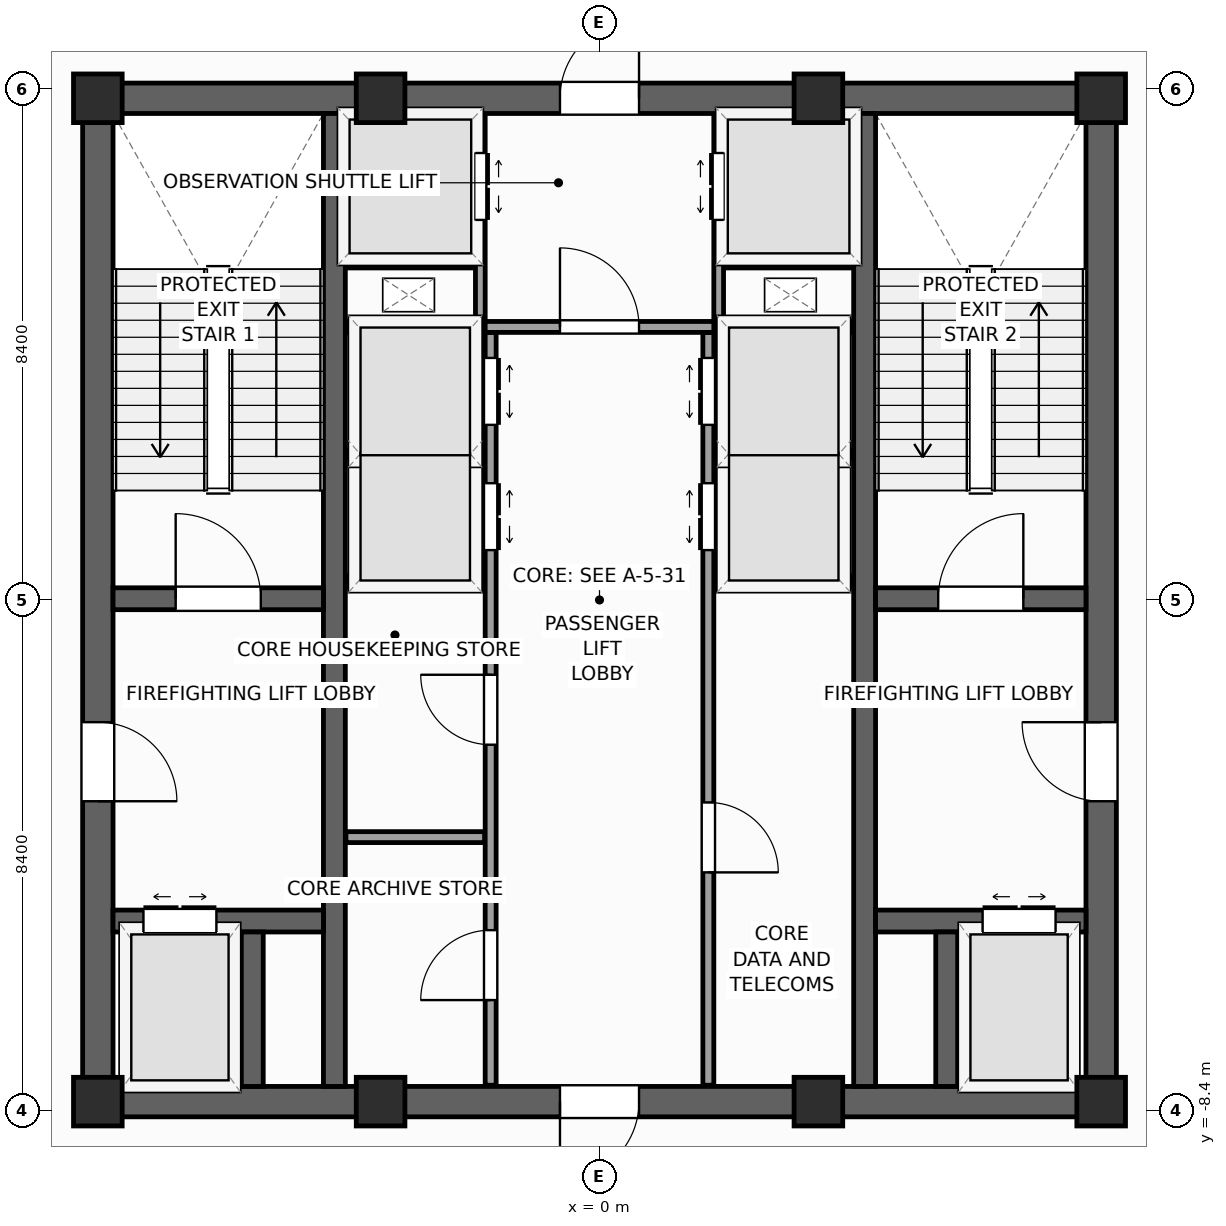
"""IFC4 building model, lengths in metres.
Left out: names, types, materials, properties, quantities, classifications, styles, units other than length and angle.
Written with IfcOpenShell. Run it as: python <this file> out.ifc"""

import sys

from ifc_helpers import new_model, si_unit, direction, frame, frame_2d, origin, origin_2d, place, context, subcontext, project, spatial, rectangle, extrude, source, transform, mapped, element, fill, save


model = new_model("IFC4")
c1 = context("Model", 3, precision=1e-05, world=origin(), true_north=direction((0.0, 1.0)))
c2 = subcontext(c1, "Body", "Model", "MODEL_VIEW")
j1 = project(units=[si_unit("LENGTHUNIT", "METRE"), si_unit("PLANEANGLEUNIT", "RADIAN")], contexts=[c1])
p1 = place(None, origin())
s1 = spatial("IfcSite", under=j1, at=p1, CompositionType="ELEMENT")
p2 = place(p1, origin())
s2 = spatial("IfcBuilding", under=s1, at=p2, CompositionType="ELEMENT")
p3 = place(p2, frame((0.0, 0.0, 316.8)))
s3 = spatial("IfcBuildingStorey", under=s2, at=p3, CompositionType="ELEMENT", Elevation=316.8)
p4 = place(p3, frame((-8.5, -8.25, 0.0), z_axis=(0.0, 0.0, 1.0), x_axis=(1.0, 0.0, 0.0)))
e1 = element("IfcWall", 1, at=p4, inside=s3, PredefinedType="SHEAR", context=c2, shape_type="SweptSolid", body=[
    extrude(rectangle(XDim=17.0, YDim=0.5, at=frame_2d((8.5, 0.0))), origin(), (0.0, 0.0, 1.0), 4.8),
])
p5 = place(p4, frame((7.85, 0.0, 0.0)))
e2 = element("IfcOpeningElement", 2, at=p5, cuts=e1, PredefinedType="OPENING", context=c2, shape_type="SweptSolid", body=[
    extrude(rectangle(XDim=1.3, YDim=2.2, at=frame_2d((0.65, 1.1))), frame((0.0, 0.26, 0.0), z_axis=(0.0, -1.0, 0.0), x_axis=(1.0, 0.0, 0.0)), (0.0, 0.0, 1.0), 0.52),
])
p6 = place(p3, frame((-8.5, 8.25, 0.0), z_axis=(0.0, 0.0, 1.0), x_axis=(1.0, 0.0, 0.0)))
e3 = element("IfcWall", 3, at=p6, inside=s3, PredefinedType="SHEAR", context=c2, shape_type="SweptSolid", body=[
    extrude(rectangle(XDim=17.0, YDim=0.5, at=frame_2d((8.5, 0.0))), origin(), (0.0, 0.0, 1.0), 4.8),
])
p7 = place(p6, frame((7.85, 0.0, 0.0)))
e4 = element("IfcOpeningElement", 4, at=p7, cuts=e3, PredefinedType="OPENING", context=c2, shape_type="SweptSolid", body=[
    extrude(rectangle(XDim=1.3, YDim=2.2, at=frame_2d((0.65, 1.1))), frame((0.0, 0.26, 0.0), z_axis=(0.0, -1.0, 0.0), x_axis=(1.0, 0.0, 0.0)), (0.0, 0.0, 1.0), 0.52),
])
p8 = place(p3, frame((-8.25, -8.0, 0.0), z_axis=(0.0, 0.0, 1.0), x_axis=(0.0, 1.0, 0.0)))
e5 = element("IfcWall", 5, at=p8, inside=s3, PredefinedType="SHEAR", context=c2, shape_type="SweptSolid", body=[
    extrude(rectangle(XDim=16.0, YDim=0.5, at=frame_2d((8.0, 0.0))), origin(), (0.0, 0.0, 1.0), 4.8),
])
p9 = place(p8, frame((4.69, 0.0, 0.0)))
e6 = element("IfcOpeningElement", 6, at=p9, cuts=e5, PredefinedType="OPENING", context=c2, shape_type="SweptSolid", body=[
    extrude(rectangle(XDim=1.3, YDim=2.2, at=frame_2d((0.65, 1.1))), frame((0.0, 0.26, 0.0), z_axis=(0.0, -1.0, 0.0), x_axis=(1.0, 0.0, 0.0)), (0.0, 0.0, 1.0), 0.52),
])
p10 = place(p3, frame((8.25, -8.0, 0.0), z_axis=(0.0, 0.0, 1.0), x_axis=(0.0, 1.0, 0.0)))
e7 = element("IfcWall", 7, at=p10, inside=s3, PredefinedType="SHEAR", context=c2, shape_type="SweptSolid", body=[
    extrude(rectangle(XDim=16.0, YDim=0.5, at=frame_2d((8.0, 0.0))), origin(), (0.0, 0.0, 1.0), 4.8),
])
p11 = place(p10, frame((4.69, 0.0, 0.0)))
e8 = element("IfcOpeningElement", 8, at=p11, cuts=e7, PredefinedType="OPENING", context=c2, shape_type="SweptSolid", body=[
    extrude(rectangle(XDim=1.3, YDim=2.2, at=frame_2d((0.65, 1.1))), frame((0.0, 0.26, 0.0), z_axis=(0.0, -1.0, 0.0), x_axis=(1.0, 0.0, 0.0)), (0.0, 0.0, 1.0), 0.52),
])
for number, where, z_axis, x_axis in (
    (9, (-4.36, -8.0, 0.0), (0.0, 0.0, 1.0), (0.0, 1.0, 0.0)),
    (10, (4.36, -8.0, 0.0), (0.0, 0.0, 1.0), (0.0, 1.0, 0.0)),
):
    element("IfcWall", number, at=place(p3, frame(where, z_axis=z_axis, x_axis=x_axis)), inside=s3, PredefinedType="SHEAR", context=c2, shape_type="SweptSolid", body=[
        extrude(rectangle(XDim=16.0, YDim=0.36, at=frame_2d((8.0, 0.0))), origin(), (0.0, 0.0, 1.0), 4.8),
    ])
p12 = place(p3, frame((-8.0, 0.02, 0.0), z_axis=(0.0, 0.0, 1.0), x_axis=(1.0, 0.0, 0.0)))
e11 = element("IfcWall", 11, at=p12, inside=s3, PredefinedType="SHEAR", context=c2, shape_type="SweptSolid", body=[
    extrude(rectangle(XDim=3.46, YDim=0.36, at=frame_2d((1.73, 0.0))), origin(), (0.0, 0.0, 1.0), 4.8),
])
p13 = place(p12, frame((1.03, 0.0, 0.0)))
e12 = element("IfcOpeningElement", 12, at=p13, cuts=e11, PredefinedType="OPENING", context=c2, shape_type="SweptSolid", body=[
    extrude(rectangle(XDim=1.4, YDim=2.2, at=frame_2d((0.7, 1.1))), frame((0.0, 0.19, 0.0), z_axis=(0.0, -1.0, 0.0), x_axis=(1.0, 0.0, 0.0)), (0.0, 0.0, 1.0), 0.38),
])
p14 = place(p3, frame((4.54, 0.02, 0.0), z_axis=(0.0, 0.0, 1.0), x_axis=(1.0, 0.0, 0.0)))
e13 = element("IfcWall", 13, at=p14, inside=s3, PredefinedType="SHEAR", context=c2, shape_type="SweptSolid", body=[
    extrude(rectangle(XDim=3.46, YDim=0.36, at=frame_2d((1.73, 0.0))), origin(), (0.0, 0.0, 1.0), 4.8),
])
p15 = place(p14, frame((1.03, 0.0, 0.0)))
e14 = element("IfcOpeningElement", 14, at=p15, cuts=e13, PredefinedType="OPENING", context=c2, shape_type="SweptSolid", body=[
    extrude(rectangle(XDim=1.4, YDim=2.2, at=frame_2d((0.7, 1.1))), frame((0.0, 0.19, 0.0), z_axis=(0.0, -1.0, 0.0), x_axis=(1.0, 0.0, 0.0)), (0.0, 0.0, 1.0), 0.38),
])
p16 = place(p3, frame((-8.0, -5.28, 0.0), z_axis=(0.0, 0.0, 1.0), x_axis=(1.0, 0.0, 0.0)))
e15 = element("IfcWall", 15, at=p16, inside=s3, PredefinedType="SHEAR", context=c2, shape_type="SweptSolid", body=[
    extrude(rectangle(XDim=3.46, YDim=0.36, at=frame_2d((1.73, 0.0))), origin(), (0.0, 0.0, 1.0), 4.8),
])
p17 = place(p16, frame((0.5, 0.0, 0.0)))
e16 = element("IfcOpeningElement", 16, at=p17, cuts=e15, PredefinedType="OPENING", context=c2, shape_type="SweptSolid", body=[
    extrude(rectangle(XDim=1.2, YDim=2.25, at=frame_2d((0.6, 1.125))), frame((0.0, 0.19, 0.0), z_axis=(0.0, -1.0, 0.0), x_axis=(1.0, 0.0, 0.0)), (0.0, 0.0, 1.0), 0.38),
])
p18 = place(p3, frame((4.54, -5.28, 0.0), z_axis=(0.0, 0.0, 1.0), x_axis=(1.0, 0.0, 0.0)))
e17 = element("IfcWall", 17, at=p18, inside=s3, PredefinedType="SHEAR", context=c2, shape_type="SweptSolid", body=[
    extrude(rectangle(XDim=3.46, YDim=0.36, at=frame_2d((1.73, 0.0))), origin(), (0.0, 0.0, 1.0), 4.8),
])
p19 = place(p18, frame((1.76, 0.0, 0.0)))
e18 = element("IfcOpeningElement", 18, at=p19, cuts=e17, PredefinedType="OPENING", context=c2, shape_type="SweptSolid", body=[
    extrude(rectangle(XDim=1.2, YDim=2.25, at=frame_2d((0.6, 1.125))), frame((0.0, 0.19, 0.0), z_axis=(0.0, -1.0, 0.0), x_axis=(1.0, 0.0, 0.0)), (0.0, 0.0, 1.0), 0.38),
])
for number, where, z_axis, x_axis in (
    (19, (-5.71, -8.0, 0.0), (0.0, 0.0, 1.0), (0.0, 1.0, 0.0)),
    (20, (5.71, -8.0, 0.0), (0.0, 0.0, 1.0), (0.0, 1.0, 0.0)),
):
    element("IfcWall", number, at=place(p3, frame(where, z_axis=z_axis, x_axis=x_axis)), inside=s3, PredefinedType="SHEAR", context=c2, shape_type="SweptSolid", body=[
        extrude(rectangle(XDim=2.54, YDim=0.36, at=frame_2d((1.27, 0.0))), origin(), (0.0, 0.0, 1.0), 4.8),
    ])
m1 = source(origin(), c2, "Body", "SweptSolid", [
    extrude(rectangle(XDim=0.8, YDim=0.8, at=origin_2d()), origin(), (0.0, 0.0, 1.0), 4.8),
])
for number, where, z_axis, x_axis in (
    (21, (-8.25, -8.25, 0.0), (0.0, 0.0, 1.0), (1.0, 0.0, 0.0)),
    (22, (8.25, -8.25, 0.0), (0.0, 0.0, 1.0), (1.0, 0.0, 0.0)),
    (23, (8.25, 8.25, 0.0), (0.0, 0.0, 1.0), (1.0, 0.0, 0.0)),
    (24, (-8.25, 8.25, 0.0), (0.0, 0.0, 1.0), (1.0, 0.0, 0.0)),
    (25, (-3.6, -8.25, 0.0), (0.0, 0.0, 1.0), (1.0, 0.0, 0.0)),
    (26, (3.6, -8.25, 0.0), (0.0, 0.0, 1.0), (1.0, 0.0, 0.0)),
    (27, (-3.6, 8.25, 0.0), (0.0, 0.0, 1.0), (1.0, 0.0, 0.0)),
    (28, (3.6, 8.25, 0.0), (0.0, 0.0, 1.0), (1.0, 0.0, 0.0)),
):
    element("IfcColumn", number, at=place(p3, frame(where, z_axis=z_axis, x_axis=x_axis)), inside=s3, PredefinedType="PILASTER", context=c2, shape_type="MappedRepresentation", body=[
        mapped(m1, transform((0.0, 0.0, 0.0), scale=1.0)),
    ])
p20 = place(p3, frame((-1.79, -7.98, 0.0), z_axis=(0.0, 0.0, 1.0), x_axis=(0.0, 1.0, 0.0)))
e29 = element("IfcWall", 29, at=p20, inside=s3, PredefinedType="PARTITIONING", context=c2, shape_type="SweptSolid", body=[
    extrude(rectangle(XDim=12.38, YDim=0.18, at=frame_2d((6.19, 0.0))), origin(), (0.0, 0.0, 1.0), 4.5),
])
p21 = place(p20, frame((8.8, 0.0, 0.0)))
e30 = element("IfcOpeningElement", 30, at=p21, cuts=e29, PredefinedType="OPENING", context=c2, shape_type="SweptSolid", body=[
    extrude(rectangle(XDim=1.1, YDim=2.2, at=frame_2d((0.55, 1.1))), frame((0.0, 0.1, 0.0), z_axis=(0.0, -1.0, 0.0), x_axis=(1.0, 0.0, 0.0)), (0.0, 0.0, 1.0), 0.2),
])
p22 = place(p20, frame((10.86, 0.0, 0.0)))
e31 = element("IfcOpeningElement", 31, at=p22, cuts=e29, PredefinedType="OPENING", context=c2, shape_type="SweptSolid", body=[
    extrude(rectangle(XDim=1.1, YDim=2.2, at=frame_2d((0.55, 1.1))), frame((0.0, 0.1, 0.0), z_axis=(0.0, -1.0, 0.0), x_axis=(1.0, 0.0, 0.0)), (0.0, 0.0, 1.0), 0.2),
])
p23 = place(p20, frame((1.4, 0.0, 0.0)))
e32 = element("IfcOpeningElement", 32, at=p23, cuts=e29, PredefinedType="OPENING", context=c2, shape_type="SweptSolid", body=[
    extrude(rectangle(XDim=1.15, YDim=2.25, at=frame_2d((0.575, 1.125))), frame((0.0, 0.1, 0.0), z_axis=(0.0, -1.0, 0.0), x_axis=(1.0, 0.0, 0.0)), (0.0, 0.0, 1.0), 0.2),
])
p24 = place(p20, frame((5.6, 0.0, 0.0)))
e33 = element("IfcOpeningElement", 33, at=p24, cuts=e29, PredefinedType="OPENING", context=c2, shape_type="SweptSolid", body=[
    extrude(rectangle(XDim=1.15, YDim=2.25, at=frame_2d((0.575, 1.125))), frame((0.0, 0.1, 0.0), z_axis=(0.0, -1.0, 0.0), x_axis=(1.0, 0.0, 0.0)), (0.0, 0.0, 1.0), 0.2),
])
p25 = place(p3, frame((1.79, -7.98, 0.0), z_axis=(0.0, 0.0, 1.0), x_axis=(0.0, 1.0, 0.0)))
e34 = element("IfcWall", 34, at=p25, inside=s3, PredefinedType="PARTITIONING", context=c2, shape_type="SweptSolid", body=[
    extrude(rectangle(XDim=12.38, YDim=0.18, at=frame_2d((6.19, 0.0))), origin(), (0.0, 0.0, 1.0), 4.5),
])
p26 = place(p25, frame((8.8, 0.0, 0.0)))
e35 = element("IfcOpeningElement", 35, at=p26, cuts=e34, PredefinedType="OPENING", context=c2, shape_type="SweptSolid", body=[
    extrude(rectangle(XDim=1.1, YDim=2.2, at=frame_2d((0.55, 1.1))), frame((0.0, 0.1, 0.0), z_axis=(0.0, -1.0, 0.0), x_axis=(1.0, 0.0, 0.0)), (0.0, 0.0, 1.0), 0.2),
])
p27 = place(p25, frame((10.86, 0.0, 0.0)))
e36 = element("IfcOpeningElement", 36, at=p27, cuts=e34, PredefinedType="OPENING", context=c2, shape_type="SweptSolid", body=[
    extrude(rectangle(XDim=1.1, YDim=2.2, at=frame_2d((0.55, 1.1))), frame((0.0, 0.1, 0.0), z_axis=(0.0, -1.0, 0.0), x_axis=(1.0, 0.0, 0.0)), (0.0, 0.0, 1.0), 0.2),
])
p28 = place(p25, frame((3.5, 0.0, 0.0)))
e37 = element("IfcOpeningElement", 37, at=p28, cuts=e34, PredefinedType="OPENING", context=c2, shape_type="SweptSolid", body=[
    extrude(rectangle(XDim=1.15, YDim=2.25, at=frame_2d((0.575, 1.125))), frame((0.0, 0.1, 0.0), z_axis=(0.0, -1.0, 0.0), x_axis=(1.0, 0.0, 0.0)), (0.0, 0.0, 1.0), 0.2),
])
p29 = place(p3, frame((-1.88, 4.49, 0.0), z_axis=(0.0, 0.0, 1.0), x_axis=(1.0, 0.0, 0.0)))
e38 = element("IfcWall", 38, at=p29, inside=s3, PredefinedType="PARTITIONING", context=c2, shape_type="SweptSolid", body=[
    extrude(rectangle(XDim=3.76, YDim=0.18, at=frame_2d((1.88, 0.0))), origin(), (0.0, 0.0, 1.0), 4.5),
])
p30 = place(p29, frame((1.23, 0.0, 0.0)))
e39 = element("IfcOpeningElement", 39, at=p30, cuts=e38, PredefinedType="OPENING", context=c2, shape_type="SweptSolid", body=[
    extrude(rectangle(XDim=1.3, YDim=2.2, at=frame_2d((0.65, 1.1))), frame((0.0, 0.1, 0.0), z_axis=(0.0, -1.0, 0.0), x_axis=(1.0, 0.0, 0.0)), (0.0, 0.0, 1.0), 0.2),
])
for number, where, z_axis, x_axis in (
    (40, (-4.17, -3.9, 0.0), (0.0, 0.0, 1.0), (1.0, 0.0, 0.0)),
    (41, (-4.17, 0.3, 0.0), (0.0, 0.0, 1.0), (1.0, 0.0, 0.0)),
    (42, (1.89, 0.3, 0.0), (0.0, 0.0, 1.0), (1.0, 0.0, 0.0)),
    (43, (-4.17, 4.49, 0.0), (0.0, 0.0, 1.0), (1.0, 0.0, 0.0)),
    (44, (1.89, 4.49, 0.0), (0.0, 0.0, 1.0), (1.0, 0.0, 0.0)),
):
    element("IfcWall", number, at=place(p3, frame(where, z_axis=z_axis, x_axis=x_axis)), inside=s3, PredefinedType="PARTITIONING", context=c2, shape_type="SweptSolid", body=[
        extrude(rectangle(XDim=2.28, YDim=0.18, at=frame_2d((1.14, 0.0))), origin(), (0.0, 0.0, 1.0), 4.5),
    ])
for number, where, z_axis, x_axis in (
    (45, (-4.16, 2.4, 0.0), (0.0, 0.0, 1.0), (1.0, 0.0, 0.0)),
    (46, (1.9, 2.4, 0.0), (0.0, 0.0, 1.0), (1.0, 0.0, 0.0)),
):
    element("IfcWall", number, at=place(p3, frame(where, z_axis=z_axis, x_axis=x_axis)), inside=s3, PredefinedType="PARTITIONING", context=c2, shape_type="SweptSolid", body=[
        extrude(rectangle(XDim=2.26, YDim=0.12, at=frame_2d((1.13, 0.0))), origin(), (0.0, 0.0, 1.0), 4.5),
    ])
p31 = place(p3, frame((-1.96, 4.58, 0.0), z_axis=(0.0, 0.0, 1.0), x_axis=(0.0, 1.0, 0.0)))
e47 = element("IfcWall", 47, at=p31, inside=s3, PredefinedType="PARTITIONING", context=c2, shape_type="SweptSolid", body=[
    extrude(rectangle(XDim=3.4, YDim=0.16, at=frame_2d((1.7, 0.0))), origin(), (0.0, 0.0, 1.0), 4.5),
])
p32 = place(p31, frame((1.67, 0.0, 0.0)))
e48 = element("IfcOpeningElement", 48, at=p32, cuts=e47, PredefinedType="OPENING", context=c2, shape_type="SweptSolid", body=[
    extrude(rectangle(XDim=1.1, YDim=2.2, at=frame_2d((0.55, 1.1))), frame((0.0, 0.09, 0.0), z_axis=(0.0, -1.0, 0.0), x_axis=(1.0, 0.0, 0.0)), (0.0, 0.0, 1.0), 0.18),
])
p33 = place(p3, frame((1.96, 4.58, 0.0), z_axis=(0.0, 0.0, 1.0), x_axis=(0.0, 1.0, 0.0)))
e49 = element("IfcWall", 49, at=p33, inside=s3, PredefinedType="PARTITIONING", context=c2, shape_type="SweptSolid", body=[
    extrude(rectangle(XDim=3.4, YDim=0.16, at=frame_2d((1.7, 0.0))), origin(), (0.0, 0.0, 1.0), 4.5),
])
p34 = place(p33, frame((1.67, 0.0, 0.0)))
e50 = element("IfcOpeningElement", 50, at=p34, cuts=e49, PredefinedType="OPENING", context=c2, shape_type="SweptSolid", body=[
    extrude(rectangle(XDim=1.1, YDim=2.2, at=frame_2d((0.55, 1.1))), frame((0.0, 0.09, 0.0), z_axis=(0.0, -1.0, 0.0), x_axis=(1.0, 0.0, 0.0)), (0.0, 0.0, 1.0), 0.18),
])
for number, where, z_axis, x_axis in (
    (51, (-4.16, 5.52, 0.0), (0.0, 0.0, 1.0), (1.0, 0.0, 0.0)),
    (52, (2.06, 5.52, 0.0), (0.0, 0.0, 1.0), (1.0, 0.0, 0.0)),
):
    element("IfcWall", number, at=place(p3, frame(where, z_axis=z_axis, x_axis=x_axis)), inside=s3, PredefinedType="PARTITIONING", context=c2, shape_type="SweptSolid", body=[
        extrude(rectangle(XDim=2.1, YDim=0.12, at=frame_2d((1.05, 0.0))), origin(), (0.0, 0.0, 1.0), 4.5),
    ])
m2 = source(origin(), c2, "Body", "SweptSolid", [
    extrude(rectangle(XDim=1.4, YDim=2.2, at=frame_2d((0.7, 1.1))), frame((0.0, 0.025, 0.0), z_axis=(0.0, -1.0, 0.0), x_axis=(1.0, 0.0, 0.0)), (0.0, 0.0, 1.0), 0.05),
])
p35 = place(p13, origin())
e53 = element("IfcDoor", 53, at=p35, inside=s3, OperationType="SINGLE_SWING_LEFT", PredefinedType="DOOR", context=c2, shape_type="MappedRepresentation", body=[
    mapped(m2, transform((0.0, 0.0, 0.0), scale=1.0)),
])
fill(e12, e53)
p36 = place(p15, origin())
e54 = element("IfcDoor", 54, at=p36, inside=s3, OperationType="SINGLE_SWING_RIGHT", PredefinedType="DOOR", context=c2, shape_type="MappedRepresentation", body=[
    mapped(m2, transform((0.0, 0.0, 0.0), scale=1.0)),
])
fill(e14, e54)
m3 = source(origin(), c2, "Body", "SweptSolid", [
    extrude(rectangle(XDim=1.3, YDim=2.2, at=frame_2d((0.65, 1.1))), frame((0.0, 0.025, 0.0), z_axis=(0.0, -1.0, 0.0), x_axis=(1.0, 0.0, 0.0)), (0.0, 0.0, 1.0), 0.05),
])
p37 = place(p9, frame((1.3, 0.0, 0.0), z_axis=(0.0, 0.0, 1.0), x_axis=(-1.0, 0.0, 0.0)))
e55 = element("IfcDoor", 55, at=p37, inside=s3, OperationType="SINGLE_SWING_LEFT", PredefinedType="DOOR", context=c2, shape_type="MappedRepresentation", body=[
    mapped(m3, transform((0.0, 0.0, 0.0), scale=1.0)),
])
fill(e6, e55)
p38 = place(p11, origin())
e56 = element("IfcDoor", 56, at=p38, inside=s3, OperationType="SINGLE_SWING_RIGHT", PredefinedType="DOOR", context=c2, shape_type="MappedRepresentation", body=[
    mapped(m3, transform((0.0, 0.0, 0.0), scale=1.0)),
])
fill(e8, e56)
p39 = place(p5, frame((1.3, 0.0, 0.0), z_axis=(0.0, 0.0, 1.0), x_axis=(-1.0, 0.0, 0.0)))
e57 = element("IfcDoor", 57, at=p39, inside=s3, OperationType="SINGLE_SWING_LEFT", PredefinedType="DOOR", context=c2, shape_type="MappedRepresentation", body=[
    mapped(m3, transform((0.0, 0.0, 0.0), scale=1.0)),
])
fill(e2, e57)
m4 = source(origin(), c2, "Body", "SweptSolid", [
    extrude(rectangle(XDim=1.2, YDim=2.25, at=frame_2d((0.6, 1.125))), frame((0.0, 0.025, 0.0), z_axis=(0.0, -1.0, 0.0), x_axis=(1.0, 0.0, 0.0)), (0.0, 0.0, 1.0), 0.05),
])
p40 = place(p17, origin())
e58 = element("IfcDoor", 58, at=p40, inside=s3, OperationType="DOUBLE_DOOR_SLIDING", PredefinedType="DOOR", context=c2, shape_type="MappedRepresentation", body=[
    mapped(m4, transform((0.0, 0.0, 0.0), scale=1.0)),
])
fill(e16, e58)
p41 = place(p19, origin())
e59 = element("IfcDoor", 59, at=p41, inside=s3, OperationType="DOUBLE_DOOR_SLIDING", PredefinedType="DOOR", context=c2, shape_type="MappedRepresentation", body=[
    mapped(m4, transform((0.0, 0.0, 0.0), scale=1.0)),
])
fill(e18, e59)
m5 = source(origin(), c2, "Body", "SweptSolid", [
    extrude(rectangle(XDim=1.1, YDim=2.2, at=frame_2d((0.55, 1.1))), frame((0.0, 0.025, 0.0), z_axis=(0.0, -1.0, 0.0), x_axis=(1.0, 0.0, 0.0)), (0.0, 0.0, 1.0), 0.05),
])
p42 = place(p21, frame((1.1, 0.0, 0.0), z_axis=(0.0, 0.0, 1.0), x_axis=(-1.0, 0.0, 0.0)))
e60 = element("IfcDoor", 60, at=p42, inside=s3, OperationType="DOUBLE_DOOR_SLIDING", PredefinedType="DOOR", context=c2, shape_type="MappedRepresentation", body=[
    mapped(m5, transform((0.0, 0.0, 0.0), scale=1.0)),
])
fill(e30, e60)
p43 = place(p22, frame((1.1, 0.0, 0.0), z_axis=(0.0, 0.0, 1.0), x_axis=(-1.0, 0.0, 0.0)))
e61 = element("IfcDoor", 61, at=p43, inside=s3, OperationType="DOUBLE_DOOR_SLIDING", PredefinedType="DOOR", context=c2, shape_type="MappedRepresentation", body=[
    mapped(m5, transform((0.0, 0.0, 0.0), scale=1.0)),
])
fill(e31, e61)
p44 = place(p26, origin())
e62 = element("IfcDoor", 62, at=p44, inside=s3, OperationType="DOUBLE_DOOR_SLIDING", PredefinedType="DOOR", context=c2, shape_type="MappedRepresentation", body=[
    mapped(m5, transform((0.0, 0.0, 0.0), scale=1.0)),
])
fill(e35, e62)
p45 = place(p27, origin())
e63 = element("IfcDoor", 63, at=p45, inside=s3, OperationType="DOUBLE_DOOR_SLIDING", PredefinedType="DOOR", context=c2, shape_type="MappedRepresentation", body=[
    mapped(m5, transform((0.0, 0.0, 0.0), scale=1.0)),
])
fill(e36, e63)
m6 = source(origin(), c2, "Body", "SweptSolid", [
    extrude(rectangle(XDim=1.15, YDim=2.25, at=frame_2d((0.575, 1.125))), frame((0.0, 0.025, 0.0), z_axis=(0.0, -1.0, 0.0), x_axis=(1.0, 0.0, 0.0)), (0.0, 0.0, 1.0), 0.05),
])
p46 = place(p23, origin())
e64 = element("IfcDoor", 64, at=p46, inside=s3, OperationType="SINGLE_SWING_LEFT", PredefinedType="DOOR", context=c2, shape_type="MappedRepresentation", body=[
    mapped(m6, transform((0.0, 0.0, 0.0), scale=1.0)),
])
fill(e32, e64)
p47 = place(p24, origin())
e65 = element("IfcDoor", 65, at=p47, inside=s3, OperationType="SINGLE_SWING_RIGHT", PredefinedType="DOOR", context=c2, shape_type="MappedRepresentation", body=[
    mapped(m6, transform((0.0, 0.0, 0.0), scale=1.0)),
])
fill(e33, e65)
p48 = place(p28, frame((1.15, 0.0, 0.0), z_axis=(0.0, 0.0, 1.0), x_axis=(-1.0, 0.0, 0.0)))
e66 = element("IfcDoor", 66, at=p48, inside=s3, OperationType="SINGLE_SWING_LEFT", PredefinedType="DOOR", context=c2, shape_type="MappedRepresentation", body=[
    mapped(m6, transform((0.0, 0.0, 0.0), scale=1.0)),
])
fill(e37, e66)
p49 = place(p30, origin())
e67 = element("IfcDoor", 67, at=p49, inside=s3, OperationType="SINGLE_SWING_LEFT", PredefinedType="DOOR", context=c2, shape_type="MappedRepresentation", body=[
    mapped(m3, transform((0.0, 0.0, 0.0), scale=1.0)),
])
fill(e39, e67)
p50 = place(p7, origin())
e68 = element("IfcDoor", 68, at=p50, inside=s3, OperationType="SINGLE_SWING_RIGHT", PredefinedType="DOOR", context=c2, shape_type="MappedRepresentation", body=[
    mapped(m3, transform((0.0, 0.0, 0.0), scale=1.0)),
])
fill(e4, e68)
p51 = place(p32, frame((1.1, 0.0, 0.0), z_axis=(0.0, 0.0, 1.0), x_axis=(-1.0, 0.0, 0.0)))
e69 = element("IfcDoor", 69, at=p51, inside=s3, OperationType="DOUBLE_DOOR_SLIDING", PredefinedType="DOOR", context=c2, shape_type="MappedRepresentation", body=[
    mapped(m5, transform((0.0, 0.0, 0.0), scale=1.0)),
])
fill(e48, e69)
p52 = place(p34, origin())
e70 = element("IfcDoor", 70, at=p52, inside=s3, OperationType="DOUBLE_DOOR_SLIDING", PredefinedType="DOOR", context=c2, shape_type="MappedRepresentation", body=[
    mapped(m5, transform((0.0, 0.0, 0.0), scale=1.0)),
])
fill(e50, e70)
save(model, sys.argv[1])
